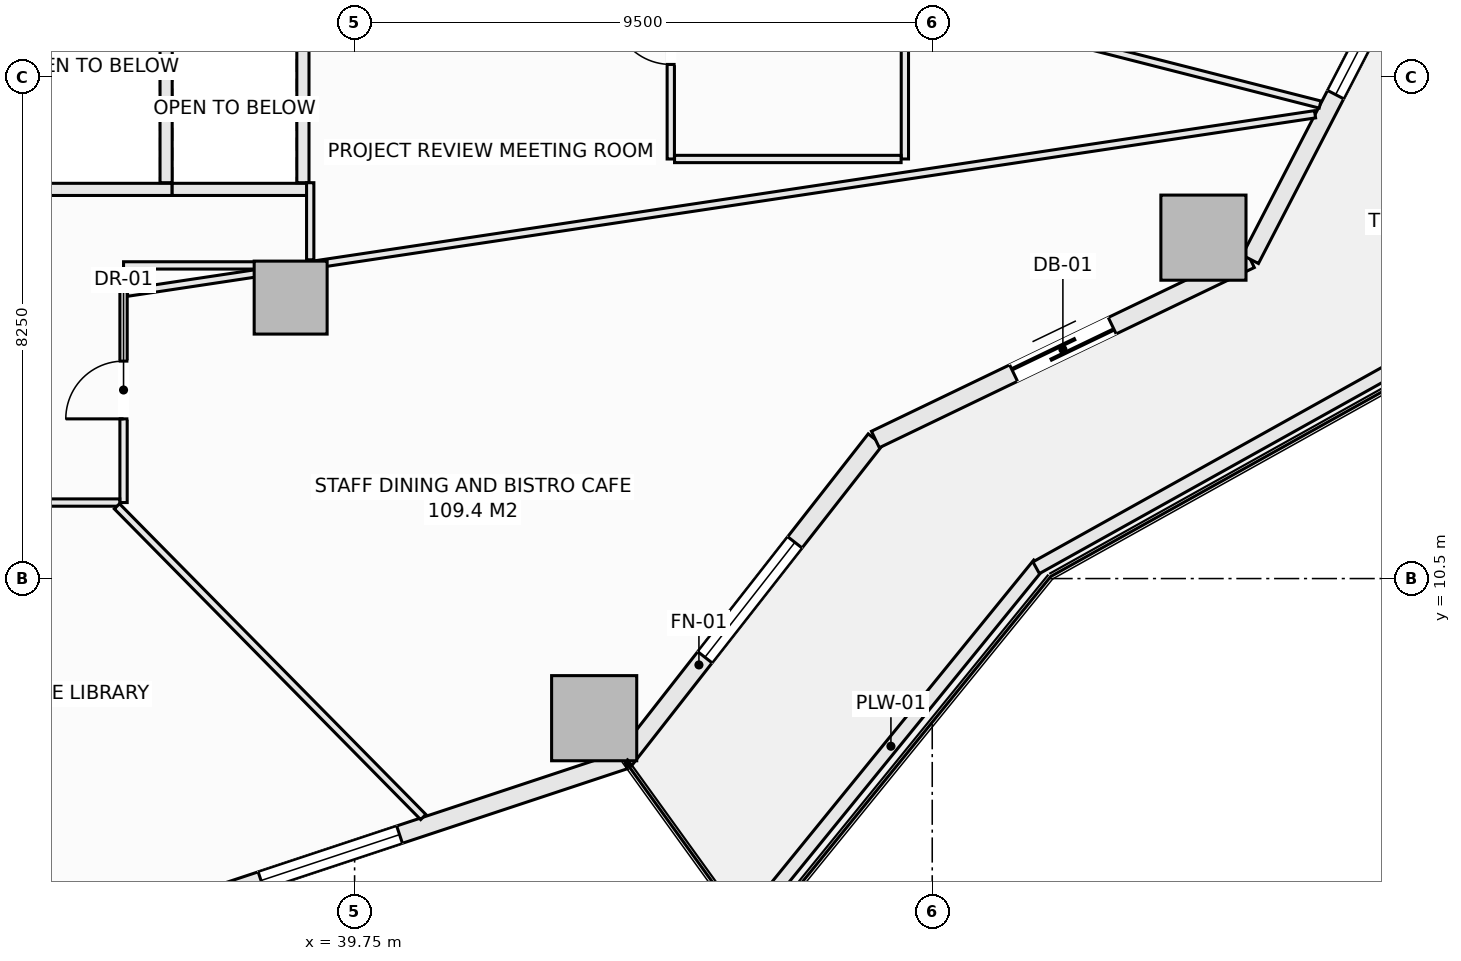
"""IFC4 building model, lengths in metres.
Left out: names, types, materials, properties, quantities, classifications, styles, units other than length and angle.
Written with IfcOpenShell. Run it as: python <this file> out.ifc"""

import sys

from ifc_helpers import new_model, si_unit, direction, frame, frame_2d, origin, origin_2d, place, context, subcontext, project, spatial, rectangle, extrude, element, fill, save


model = new_model("IFC4")
c1 = context("Model", 3, precision=1e-05, world=origin(), true_north=direction((0.0, 1.0)))
c2 = subcontext(c1, "Body", "Model", "MODEL_VIEW")
j1 = project(units=[si_unit("LENGTHUNIT", "METRE"), si_unit("PLANEANGLEUNIT", "RADIAN")], contexts=[c1])
p1 = place(None, origin())
s1 = spatial("IfcSite", under=j1, at=p1, CompositionType="ELEMENT")
p2 = place(p1, origin())
s2 = spatial("IfcBuilding", under=s1, at=p2, CompositionType="ELEMENT")
p3 = place(p2, frame((0.0, 0.0, 45.75)))
s3 = spatial("IfcBuildingStorey", under=s2, at=p3, CompositionType="ELEMENT", Elevation=45.75)
for number, where, z_axis, x_axis in (
    (1, (43.69, 8.204, -0.28), (0.0, 0.0, 1.0), (1.0, 0.0, 0.0)),
    (2, (53.71, 16.106, -0.28), (0.0, 0.0, 1.0), (1.0, 0.0, 0.0)),
):
    element("IfcColumn", number, at=place(p3, frame(where, z_axis=z_axis, x_axis=x_axis)), inside=s3, PredefinedType="COLUMN", context=c2, shape_type="SweptSolid", body=[
        extrude(rectangle(XDim=1.4, YDim=1.4, at=origin_2d()), origin(), (0.0, 0.0, 1.0), 3.85),
    ])
p4 = place(p3, frame((38.698, 15.121, -0.28), z_axis=(0.0, 0.0, 1.0), x_axis=(1.0, 0.0, 0.0)))
e3 = element("IfcColumn", 3, at=p4, inside=s3, PredefinedType="COLUMN", context=c2, shape_type="SweptSolid", body=[
    extrude(rectangle(XDim=1.2, YDim=1.2, at=origin_2d()), origin(), (0.0, 0.0, 1.0), 3.85),
])
p5 = place(p3, frame((37.404, 5.267, 0.0), z_axis=(0.0, 0.0, 1.0), x_axis=(0.949238715533, 0.31455661006, 0.0)))
e4 = element("IfcWall", 4, at=p5, inside=s3, PredefinedType="SOLIDWALL", context=c2, shape_type="SweptSolid", body=[
    extrude(rectangle(XDim=7.146, YDim=0.3, at=frame_2d((3.573, 0.0))), origin(), (0.0, 0.0, 1.0), 3.093),
])
p6 = place(p5, frame((0.85, 0.0, 0.85)))
e5 = element("IfcOpeningElement", 5, at=p6, cuts=e4, PredefinedType="OPENING", context=c2, shape_type="SweptSolid", body=[
    extrude(rectangle(XDim=2.4, YDim=1.9, at=frame_2d((1.2, 0.95))), frame((0.0, 0.16, 0.0), z_axis=(0.0, -1.0, 0.0), x_axis=(1.0, 0.0, 0.0)), (0.0, 0.0, 1.0), 0.32),
])
p7 = place(p3, frame((44.188, 7.514, 0.0), z_axis=(0.0, 0.0, 1.0), x_axis=(0.616421309777, 0.787416515482, 0.0)))
e6 = element("IfcWall", 6, at=p7, inside=s3, PredefinedType="SOLIDWALL", context=c2, shape_type="SweptSolid", body=[
    extrude(rectangle(XDim=6.696, YDim=0.3, at=frame_2d((3.348, 0.0))), origin(), (0.0, 0.0, 1.0), 3.093),
])
p8 = place(p7, frame((2.148, 0.0, 0.85)))
e7 = element("IfcOpeningElement", 7, at=p8, cuts=e6, PredefinedType="OPENING", context=c2, shape_type="SweptSolid", body=[
    extrude(rectangle(XDim=2.4, YDim=1.9, at=frame_2d((1.2, 0.95))), frame((0.0, 0.16, 0.0), z_axis=(0.0, -1.0, 0.0), x_axis=(1.0, 0.0, 0.0)), (0.0, 0.0, 1.0), 0.32),
])
p9 = place(p3, frame((48.315, 12.787, 0.0), z_axis=(0.0, 0.0, 1.0), x_axis=(0.901360393999, 0.433069786673, 0.0)))
e8 = element("IfcWall", 8, at=p9, inside=s3, PredefinedType="SOLIDWALL", context=c2, shape_type="SweptSolid", body=[
    extrude(rectangle(XDim=6.842, YDim=0.3, at=frame_2d((3.421, 0.0))), origin(), (0.0, 0.0, 1.0), 3.093),
])
p10 = place(p9, frame((2.521, 0.0, 0.0)))
e9 = element("IfcOpeningElement", 9, at=p10, cuts=e8, PredefinedType="OPENING", context=c2, shape_type="SweptSolid", body=[
    extrude(rectangle(XDim=1.8, YDim=2.25, at=frame_2d((0.9, 1.125))), frame((0.0, 0.16, 0.0), z_axis=(0.0, -1.0, 0.0), x_axis=(1.0, 0.0, 0.0)), (0.0, 0.0, 1.0), 0.32),
])
p11 = place(p3, frame((54.482, 15.75, 0.0), z_axis=(0.0, 0.0, 1.0), x_axis=(0.459809804413, 0.88801742312, 0.0)))
e10 = element("IfcWall", 10, at=p11, inside=s3, PredefinedType="SOLIDWALL", context=c2, shape_type="SweptSolid", body=[
    extrude(rectangle(XDim=6.111, YDim=0.3, at=frame_2d((3.055, 0.0))), origin(), (0.0, 0.0, 1.0), 3.093),
])
p12 = place(p11, frame((3.05, 0.0, 0.85)))
e11 = element("IfcOpeningElement", 11, at=p12, cuts=e10, PredefinedType="OPENING", context=c2, shape_type="SweptSolid", body=[
    extrude(rectangle(XDim=2.4, YDim=1.9, at=frame_2d((1.2, 0.95))), frame((0.0, 0.16, 0.0), z_axis=(0.0, -1.0, 0.0), x_axis=(1.0, 0.0, 0.0)), (0.0, 0.0, 1.0), 0.32),
])
p13 = place(p3, frame((46.136, 4.749, 0.0), z_axis=(0.0, 0.0, 1.0), x_axis=(0.630997450658, 0.775784903993, 0.0)))
e12 = element("IfcWall", 12, at=p13, inside=s3, PredefinedType="PARAPET", context=c2, shape_type="SweptSolid", body=[
    extrude(rectangle(XDim=7.718, YDim=0.22, at=frame_2d((3.859, 0.0))), origin(), (0.0, 0.0, 1.0), 0.52),
])
p14 = place(p3, frame((50.959, 10.678, 0.0), z_axis=(0.0, 0.0, 1.0), x_axis=(0.873500119739, 0.48682393205, 0.0)))
e13 = element("IfcWall", 13, at=p14, inside=s3, PredefinedType="PARAPET", context=c2, shape_type="SweptSolid", body=[
    extrude(rectangle(XDim=7.562, YDim=0.22, at=frame_2d((3.781, 0.0))), origin(), (0.0, 0.0, 1.0), 0.52),
])
p15 = place(p3, frame((34.5, 16.9, 0.0), z_axis=(0.0, 0.0, 1.0), x_axis=(1.0, 0.0, 0.0)))
e14 = element("IfcWall", 14, at=p15, inside=s3, PredefinedType="SOLIDWALL", context=c2, shape_type="SweptSolid", body=[
    extrude(rectangle(XDim=2.25, YDim=0.2, at=frame_2d((1.125, 0.0))), origin(), (0.0, 0.0, 1.0), 3.57),
])
p16 = place(p3, frame((36.65, 17.01, 0.0), z_axis=(0.0, 0.0, 1.0), x_axis=(0.0, 1.0, 0.0)))
e15 = element("IfcWall", 15, at=p16, inside=s3, PredefinedType="SOLIDWALL", context=c2, shape_type="SweptSolid", body=[
    extrude(rectangle(XDim=2.43, YDim=0.2, at=frame_2d((1.215, 0.0))), origin(), (0.0, 0.0, 1.0), 3.57),
])
p17 = place(p3, frame((36.75, 16.9, 0.0), z_axis=(0.0, 0.0, 1.0), x_axis=(1.0, 0.0, 0.0)))
e16 = element("IfcWall", 16, at=p17, inside=s3, PredefinedType="SOLIDWALL", context=c2, shape_type="SweptSolid", body=[
    extrude(rectangle(XDim=2.25, YDim=0.2, at=frame_2d((1.125, 0.0))), origin(), (0.0, 0.0, 1.0), 3.57),
])
p18 = place(p3, frame((38.9, 17.01, 0.0), z_axis=(0.0, 0.0, 1.0), x_axis=(0.0, 1.0, 0.0)))
e17 = element("IfcWall", 17, at=p18, inside=s3, PredefinedType="SOLIDWALL", context=c2, shape_type="SweptSolid", body=[
    extrude(rectangle(XDim=2.43, YDim=0.2, at=frame_2d((1.215, 0.0))), origin(), (0.0, 0.0, 1.0), 3.57),
])
p19 = place(p3, frame((35.95, 15.65, 0.0), z_axis=(0.0, 0.0, 1.0), x_axis=(1.0, 0.0, 0.0)))
e18 = element("IfcWall", 18, at=p19, inside=s3, PredefinedType="PARTITIONING", context=c2, shape_type="SweptSolid", body=[
    extrude(rectangle(XDim=2.291, YDim=0.12, at=frame_2d((1.146, 0.0))), origin(), (0.0, 0.0, 1.0), 3.57),
])
p20 = place(p3, frame((35.95, 11.75, 0.0), z_axis=(0.0, 0.0, 1.0), x_axis=(0.0, 1.0, 0.0)))
e19 = element("IfcWall", 19, at=p20, inside=s3, PredefinedType="PARTITIONING", context=c2, shape_type="SweptSolid", body=[
    extrude(rectangle(XDim=3.838, YDim=0.12, at=frame_2d((1.919, 0.0))), origin(), (0.0, 0.0, 1.0), 3.57),
])
p21 = place(p20, frame((1.376, 0.0, 0.0)))
e20 = element("IfcOpeningElement", 20, at=p21, cuts=e19, PredefinedType="OPENING", context=c2, shape_type="SweptSolid", body=[
    extrude(rectangle(XDim=0.95, YDim=2.1, at=frame_2d((0.475, 1.05))), frame((0.0, 0.07, 0.0), z_axis=(0.0, -1.0, 0.0), x_axis=(1.0, 0.0, 0.0)), (0.0, 0.0, 1.0), 0.14),
])
p22 = place(p3, frame((27.227, 11.75, 0.0), z_axis=(0.0, 0.0, 1.0), x_axis=(1.0, 0.0, 0.0)))
e21 = element("IfcWall", 21, at=p22, inside=s3, PredefinedType="PARTITIONING", context=c2, shape_type="SweptSolid", body=[
    extrude(rectangle(XDim=8.661, YDim=0.12, at=frame_2d((4.331, 0.0))), origin(), (0.0, 0.0, 1.0), 3.57),
])
p23 = place(p22, frame((2.318, 0.0, 0.0)))
e22 = element("IfcOpeningElement", 22, at=p23, cuts=e21, PredefinedType="OPENING", context=c2, shape_type="SweptSolid", body=[
    extrude(rectangle(XDim=0.95, YDim=2.1, at=frame_2d((0.475, 1.05))), frame((0.0, 0.07, 0.0), z_axis=(0.0, -1.0, 0.0), x_axis=(1.0, 0.0, 0.0)), (0.0, 0.0, 1.0), 0.14),
])
p24 = place(p22, frame((6.114, 0.0, 0.0)))
e23 = element("IfcOpeningElement", 23, at=p24, cuts=e21, PredefinedType="OPENING", context=c2, shape_type="SweptSolid", body=[
    extrude(rectangle(XDim=0.95, YDim=2.1, at=frame_2d((0.475, 1.05))), frame((0.0, 0.07, 0.0), z_axis=(0.0, -1.0, 0.0), x_axis=(1.0, 0.0, 0.0)), (0.0, 0.0, 1.0), 0.14),
])
p25 = place(p3, frame((44.95, 17.4, 0.0), z_axis=(0.0, 0.0, 1.0), x_axis=(0.0, 1.0, 0.0)))
e24 = element("IfcWall", 24, at=p25, inside=s3, PredefinedType="PARTITIONING", context=c2, shape_type="SweptSolid", body=[
    extrude(rectangle(XDim=5.62, YDim=0.12, at=frame_2d((2.81, 0.0))), origin(), (0.0, 0.0, 1.0), 3.57),
])
p26 = place(p25, frame((1.555, 0.0, 0.0)))
e25 = element("IfcOpeningElement", 25, at=p26, cuts=e24, PredefinedType="OPENING", context=c2, shape_type="SweptSolid", body=[
    extrude(rectangle(XDim=0.95, YDim=2.1, at=frame_2d((0.475, 1.05))), frame((0.0, 0.07, 0.0), z_axis=(0.0, -1.0, 0.0), x_axis=(1.0, 0.0, 0.0)), (0.0, 0.0, 1.0), 0.14),
])
p27 = place(p3, frame((48.8, 17.4, 0.0), z_axis=(0.0, 0.0, 1.0), x_axis=(0.0, 1.0, 0.0)))
e26 = element("IfcWall", 26, at=p27, inside=s3, PredefinedType="PARTITIONING", context=c2, shape_type="SweptSolid", body=[
    extrude(rectangle(XDim=1.92, YDim=0.12, at=frame_2d((0.96, 0.0))), origin(), (0.0, 0.0, 1.0), 3.57),
])
p28 = place(p3, frame((45.012, 17.4, 0.0), z_axis=(0.0, 0.0, 1.0), x_axis=(1.0, 0.0, 0.0)))
e27 = element("IfcWall", 27, at=p28, inside=s3, PredefinedType="PARTITIONING", context=c2, shape_type="SweptSolid", body=[
    extrude(rectangle(XDim=3.726, YDim=0.12, at=frame_2d((1.863, 0.0))), origin(), (0.0, 0.0, 1.0), 3.57),
])
p29 = place(p3, frame((39.02, 15.742, 0.0), z_axis=(0.0, 0.0, 1.0), x_axis=(0.0, 1.0, 0.0)))
e28 = element("IfcWall", 28, at=p29, inside=s3, PredefinedType="PARTITIONING", context=c2, shape_type="SweptSolid", body=[
    extrude(rectangle(XDim=1.268, YDim=0.12, at=frame_2d((0.634, 0.0))), origin(), (0.0, 0.0, 1.0), 2.934),
])
p30 = place(p3, frame((46.932, 20.512, 0.0), z_axis=(0.0, 0.0, 1.0), x_axis=(0.969002278344, -0.247051785187, 0.0)))
e29 = element("IfcWall", 29, at=p30, inside=s3, PredefinedType="PARTITIONING", context=c2, shape_type="SweptSolid", body=[
    extrude(rectangle(XDim=8.975, YDim=0.12, at=frame_2d((4.488, 0.0))), origin(), (0.0, 0.0, 1.0), 3.57),
])
p31 = place(p3, frame((36.012, 15.202, 0.0), z_axis=(0.0, 0.0, 1.0), x_axis=(0.988905340033, 0.148547058049, 0.0)))
e30 = element("IfcWall", 30, at=p31, inside=s3, PredefinedType="PARTITIONING", context=c2, shape_type="SweptSolid", body=[
    extrude(rectangle(XDim=2.196, YDim=0.12, at=frame_2d((1.098, 0.0))), origin(), (0.0, 0.0, 1.0), 2.934),
])
p32 = place(p3, frame((38.241, 15.537, 0.0), z_axis=(0.0, 0.0, 1.0), x_axis=(0.988910037188, 0.148515784849, 0.0)))
e31 = element("IfcWall", 31, at=p32, inside=s3, PredefinedType="PARTITIONING", context=c2, shape_type="SweptSolid", body=[
    extrude(rectangle(XDim=17.499, YDim=0.12, at=frame_2d((8.75, 0.0))), origin(), (0.0, 0.0, 1.0), 3.205),
])
p33 = place(p3, frame((35.841, 11.688, 0.0), z_axis=(0.0, 0.0, 1.0), x_axis=(0.702122050881, -0.712056616897, 0.0)))
e32 = element("IfcWall", 32, at=p33, inside=s3, PredefinedType="PARTITIONING", context=c2, shape_type="SweptSolid", body=[
    extrude(rectangle(XDim=7.176, YDim=0.12, at=frame_2d((3.588, 0.0))), origin(), (0.0, 0.0, 1.0), 3.57),
])
p34 = place(p6, origin())
e33 = element("IfcWindow", 33, at=p34, inside=s3, PartitioningType="SINGLE_PANEL", PredefinedType="WINDOW", context=c2, shape_type="SweptSolid", body=[
    extrude(rectangle(XDim=2.4, YDim=1.9, at=frame_2d((1.2, 0.95))), frame((0.0, 0.03, 0.0), z_axis=(0.0, -1.0, 0.0), x_axis=(1.0, 0.0, 0.0)), (0.0, 0.0, 1.0), 0.06),
])
fill(e5, e33)
p35 = place(p8, origin())
e34 = element("IfcWindow", 34, at=p35, inside=s3, PartitioningType="SINGLE_PANEL", PredefinedType="WINDOW", context=c2, shape_type="SweptSolid", body=[
    extrude(rectangle(XDim=2.4, YDim=1.9, at=frame_2d((1.2, 0.95))), frame((0.0, 0.03, 0.0), z_axis=(0.0, -1.0, 0.0), x_axis=(1.0, 0.0, 0.0)), (0.0, 0.0, 1.0), 0.06),
])
fill(e7, e34)
p36 = place(p10, frame((1.8, 0.0, 0.0), z_axis=(0.0, 0.0, 1.0), x_axis=(-1.0, 0.0, 0.0)))
e35 = element("IfcDoor", 35, at=p36, inside=s3, OperationType="SLIDING_TO_LEFT", PredefinedType="DOOR", context=c2, shape_type="SweptSolid", body=[
    extrude(rectangle(XDim=1.8, YDim=2.25, at=frame_2d((0.9, 1.125))), frame((0.0, 0.025, 0.0), z_axis=(0.0, -1.0, 0.0), x_axis=(1.0, 0.0, 0.0)), (0.0, 0.0, 1.0), 0.05),
])
fill(e9, e35)
p37 = place(p12, origin())
e36 = element("IfcWindow", 36, at=p37, inside=s3, PartitioningType="SINGLE_PANEL", PredefinedType="WINDOW", context=c2, shape_type="SweptSolid", body=[
    extrude(rectangle(XDim=2.4, YDim=1.9, at=frame_2d((1.2, 0.95))), frame((0.0, 0.03, 0.0), z_axis=(0.0, -1.0, 0.0), x_axis=(1.0, 0.0, 0.0)), (0.0, 0.0, 1.0), 0.06),
])
fill(e11, e36)
p38 = place(p21, origin())
e37 = element("IfcDoor", 37, at=p38, inside=s3, OperationType="SINGLE_SWING_LEFT", PredefinedType="DOOR", context=c2, shape_type="SweptSolid", body=[
    extrude(rectangle(XDim=0.95, YDim=2.1, at=frame_2d((0.475, 1.05))), frame((0.0, 0.025, 0.0), z_axis=(0.0, -1.0, 0.0), x_axis=(1.0, 0.0, 0.0)), (0.0, 0.0, 1.0), 0.05),
])
fill(e20, e37)
p39 = place(p26, origin())
e38 = element("IfcDoor", 38, at=p39, inside=s3, OperationType="SINGLE_SWING_RIGHT", PredefinedType="DOOR", context=c2, shape_type="SweptSolid", body=[
    extrude(rectangle(XDim=0.95, YDim=2.1, at=frame_2d((0.475, 1.05))), frame((0.0, 0.025, 0.0), z_axis=(0.0, -1.0, 0.0), x_axis=(1.0, 0.0, 0.0)), (0.0, 0.0, 1.0), 0.05),
])
fill(e25, e38)
save(model, sys.argv[1])
